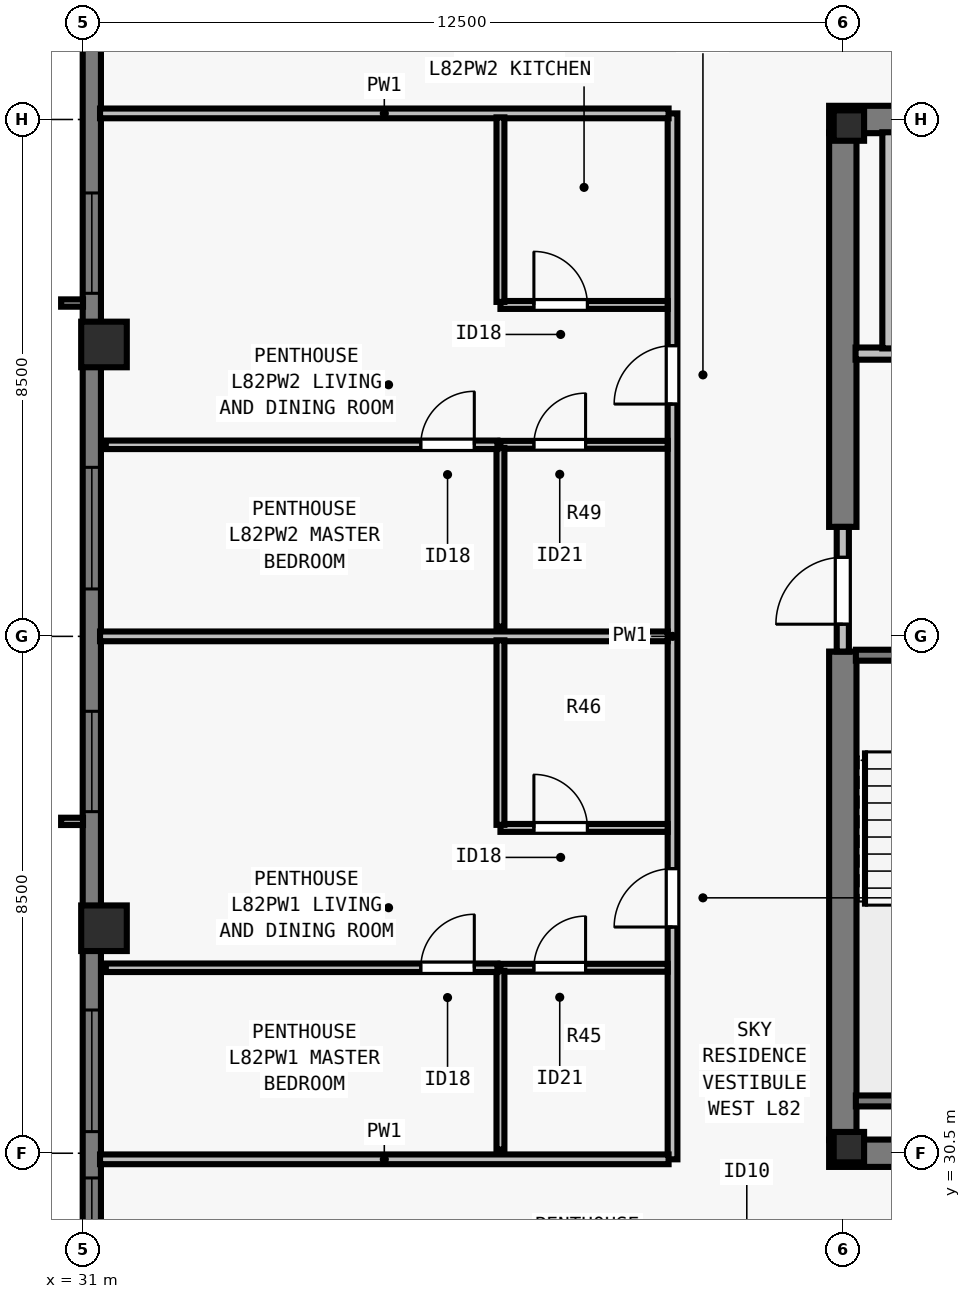
"""IFC4 building model, lengths in metres.
Left out: names, types, materials, properties, quantities, classifications, styles, units other than length and angle.
Written with IfcOpenShell. Run it as: python <this file> out.ifc"""

import sys

from ifc_helpers import new_model, si_unit, direction, frame, frame_2d, origin, origin_2d, place, context, subcontext, project, spatial, rectangle, i_section, extrude, element, fill, save


model = new_model("IFC4")
c1 = context("Model", 3, precision=1e-05, world=origin(), true_north=direction((0.0, 1.0)))
c2 = subcontext(c1, "Body", "Model", "MODEL_VIEW")
j1 = project(units=[si_unit("LENGTHUNIT", "METRE"), si_unit("PLANEANGLEUNIT", "RADIAN")], contexts=[c1])
p1 = place(None, origin())
s1 = spatial("IfcSite", under=j1, at=p1, CompositionType="ELEMENT")
p2 = place(p1, origin())
s2 = spatial("IfcBuilding", under=s1, at=p2, CompositionType="ELEMENT")
p3 = place(p2, frame((0.0, 0.0, 298.0)))
s3 = spatial("IfcBuildingStorey", under=s2, at=p3, CompositionType="ELEMENT", Elevation=298.0)
for number, where, z_axis, x_axis in (
    (1, (43.6, 30.6, 0.0), (0.0, 0.0, 1.0), (1.0, 0.0, 0.0)),
    (2, (43.6, 47.4, 0.0), (0.0, 0.0, 1.0), (1.0, 0.0, 0.0)),
):
    element("IfcColumn", number, at=place(p3, frame(where, z_axis=z_axis, x_axis=x_axis)), inside=s3, PredefinedType="COLUMN", context=c2, shape_type="SweptSolid", body=[
        extrude(i_section(OverallWidth=0.5, OverallDepth=0.5, WebThickness=0.028, FlangeThickness=0.045, at=origin_2d()), origin(), (0.0, 0.0, 1.0), 3.5),
    ])
for number, where, z_axis, x_axis in (
    (3, (31.35, 43.8, 0.0), (0.0, 0.0, 1.0), (0.0, 1.0, 0.0)),
    (4, (31.35, 34.2, 0.0), (0.0, 0.0, 1.0), (0.0, 1.0, 0.0)),
):
    element("IfcColumn", number, at=place(p3, frame(where, z_axis=z_axis, x_axis=x_axis)), inside=s3, PredefinedType="COLUMN", context=c2, shape_type="SweptSolid", body=[
        extrude(rectangle(XDim=0.75, YDim=0.75, at=origin_2d()), origin(), (0.0, 0.0, 1.0), 3.5),
    ])
p4 = place(p3, frame((31.15, 23.5, 0.0), z_axis=(0.0, 0.0, 1.0), x_axis=(0.0, 1.0, 0.0)))
e5 = element("IfcWall", 5, at=p4, inside=s3, PredefinedType="SOLIDWALL", context=c2, shape_type="SweptSolid", body=[
    extrude(rectangle(XDim=30.722, YDim=0.3, at=frame_2d((15.361, 0.0))), origin(), (0.0, 0.0, 1.0), 3.29),
])
p5 = place(p4, frame((4.944, 0.0, 0.8)))
e6 = element("IfcOpeningElement", 6, at=p5, cuts=e5, PredefinedType="OPENING", context=c2, shape_type="SweptSolid", body=[
    extrude(rectangle(XDim=1.65, YDim=1.758, at=frame_2d((0.825, 0.879))), frame((0.0, 0.16, 0.0), z_axis=(0.0, -1.0, 0.0), x_axis=(1.0, 0.0, 0.0)), (0.0, 0.0, 1.0), 0.32),
])
p6 = place(p4, frame((7.355, 0.0, 0.8)))
e7 = element("IfcOpeningElement", 7, at=p6, cuts=e5, PredefinedType="OPENING", context=c2, shape_type="SweptSolid", body=[
    extrude(rectangle(XDim=2.0, YDim=1.758, at=frame_2d((1.0, 0.879))), frame((0.0, 0.16, 0.0), z_axis=(0.0, -1.0, 0.0), x_axis=(1.0, 0.0, 0.0)), (0.0, 0.0, 1.0), 0.32),
])
p7 = place(p4, frame((12.617, 0.0, 0.8)))
e8 = element("IfcOpeningElement", 8, at=p7, cuts=e5, PredefinedType="OPENING", context=c2, shape_type="SweptSolid", body=[
    extrude(rectangle(XDim=1.65, YDim=1.758, at=frame_2d((0.825, 0.879))), frame((0.0, 0.16, 0.0), z_axis=(0.0, -1.0, 0.0), x_axis=(1.0, 0.0, 0.0)), (0.0, 0.0, 1.0), 0.32),
])
p8 = place(p4, frame((16.28, 0.0, 0.8)))
e9 = element("IfcOpeningElement", 9, at=p8, cuts=e5, PredefinedType="OPENING", context=c2, shape_type="SweptSolid", body=[
    extrude(rectangle(XDim=2.0, YDim=1.758, at=frame_2d((1.0, 0.879))), frame((0.0, 0.16, 0.0), z_axis=(0.0, -1.0, 0.0), x_axis=(1.0, 0.0, 0.0)), (0.0, 0.0, 1.0), 0.32),
])
p9 = place(p4, frame((21.142, 0.0, 0.8)))
e10 = element("IfcOpeningElement", 10, at=p9, cuts=e5, PredefinedType="OPENING", context=c2, shape_type="SweptSolid", body=[
    extrude(rectangle(XDim=1.65, YDim=1.758, at=frame_2d((0.825, 0.879))), frame((0.0, 0.16, 0.0), z_axis=(0.0, -1.0, 0.0), x_axis=(1.0, 0.0, 0.0)), (0.0, 0.0, 1.0), 0.32),
])
p10 = place(p4, frame((27.11, 0.0, 0.8)))
e11 = element("IfcOpeningElement", 11, at=p10, cuts=e5, PredefinedType="OPENING", context=c2, shape_type="SweptSolid", body=[
    extrude(rectangle(XDim=0.9, YDim=1.75, at=frame_2d((0.45, 0.875))), frame((0.0, 0.16, 0.0), z_axis=(0.0, -1.0, 0.0), x_axis=(1.0, 0.0, 0.0)), (0.0, 0.0, 1.0), 0.32),
])
for number, where, z_axis, x_axis in (
    (12, (43.275, 30.5, 0.0), (0.0, 0.0, 1.0), (1.0, 0.0, 0.0)),
    (13, (43.275, 47.5, 0.0), (0.0, 0.0, 1.0), (1.0, 0.0, 0.0)),
):
    element("IfcWall", number, at=place(p3, frame(where, z_axis=z_axis, x_axis=x_axis)), inside=s3, PredefinedType="SHEAR", context=c2, shape_type="SweptSolid", body=[
        extrude(rectangle(XDim=17.45, YDim=0.45, at=frame_2d((8.725, 0.0))), origin(), (0.0, 0.0, 1.0), 3.29),
    ])
p11 = place(p3, frame((43.5, 30.715, 0.0), z_axis=(0.0, 0.0, 1.0), x_axis=(0.0, 1.0, 0.0)))
e14 = element("IfcWall", 14, at=p11, inside=s3, PredefinedType="SHEAR", context=c2, shape_type="SweptSolid", body=[
    extrude(rectangle(XDim=8.035, YDim=0.45, at=frame_2d((4.018, 0.0))), origin(), (0.0, 0.0, 1.0), 3.29),
])
p12 = place(p3, frame((43.5, 40.8, 0.0), z_axis=(0.0, 0.0, 1.0), x_axis=(0.0, 1.0, 0.0)))
e15 = element("IfcWall", 15, at=p12, inside=s3, PredefinedType="SHEAR", context=c2, shape_type="SweptSolid", body=[
    extrude(rectangle(XDim=6.485, YDim=0.45, at=frame_2d((3.242, 0.0))), origin(), (0.0, 0.0, 1.0), 3.29),
])
p13 = place(p3, frame((43.5, 38.75, 0.0), z_axis=(0.0, 0.0, 1.0), x_axis=(0.0, 1.0, 0.0)))
e16 = element("IfcWall", 16, at=p13, inside=s3, PredefinedType="SOLIDWALL", context=c2, shape_type="SweptSolid", body=[
    extrude(rectangle(XDim=2.05, YDim=0.2, at=frame_2d((1.025, 0.0))), origin(), (0.0, 0.0, 1.0), 3.29),
])
p14 = place(p13, frame((0.45, 0.0, 0.0)))
e17 = element("IfcOpeningElement", 17, at=p14, cuts=e16, PredefinedType="OPENING", context=c2, shape_type="SweptSolid", body=[
    extrude(rectangle(XDim=1.1, YDim=2.15, at=frame_2d((0.55, 1.075))), frame((0.0, 0.11, 0.0), z_axis=(0.0, -1.0, 0.0), x_axis=(1.0, 0.0, 0.0)), (0.0, 0.0, 1.0), 0.22),
])
p15 = place(p3, frame((43.71, 43.65, 0.0), z_axis=(0.0, 0.0, 1.0), x_axis=(1.0, 0.0, 0.0)))
e18 = element("IfcWall", 18, at=p15, inside=s3, PredefinedType="SOLIDWALL", context=c2, shape_type="SweptSolid", body=[
    extrude(rectangle(XDim=3.555, YDim=0.2, at=frame_2d((1.777, 0.0))), origin(), (0.0, 0.0, 1.0), 3.29),
])
p16 = place(p15, frame((1.16, 0.0, 0.0)))
e19 = element("IfcOpeningElement", 19, at=p16, cuts=e18, PredefinedType="OPENING", context=c2, shape_type="SweptSolid", body=[
    extrude(rectangle(XDim=1.1, YDim=2.2, at=frame_2d((0.55, 1.1))), frame((0.0, 0.11, 0.0), z_axis=(0.0, -1.0, 0.0), x_axis=(1.0, 0.0, 0.0)), (0.0, 0.0, 1.0), 0.22),
])
p17 = place(p3, frame((44.25, 43.735, 0.0), z_axis=(0.0, 0.0, 1.0), x_axis=(0.0, 1.0, 0.0)))
e20 = element("IfcWall", 20, at=p17, inside=s3, PredefinedType="SOLIDWALL", context=c2, shape_type="SweptSolid", body=[
    extrude(rectangle(XDim=3.555, YDim=0.2, at=frame_2d((1.777, 0.0))), origin(), (0.0, 0.0, 1.0), 3.29),
])
p18 = place(p3, frame((40.7, 30.4, 0.0), z_axis=(0.0, 0.0, 1.0), x_axis=(0.0, 1.0, 0.0)))
e21 = element("IfcWall", 21, at=p18, inside=s3, PredefinedType="PARTITIONING", context=c2, shape_type="SweptSolid", body=[
    extrude(rectangle(XDim=17.2, YDim=0.16, at=frame_2d((8.6, 0.0))), origin(), (0.0, 0.0, 1.0), 3.009),
])
p19 = place(p18, frame((3.82, 0.0, 0.0)))
e22 = element("IfcOpeningElement", 22, at=p19, cuts=e21, PredefinedType="OPENING", context=c2, shape_type="SweptSolid", body=[
    extrude(rectangle(XDim=0.96, YDim=2.18, at=frame_2d((0.48, 1.09))), frame((0.0, 0.09, 0.0), z_axis=(0.0, -1.0, 0.0), x_axis=(1.0, 0.0, 0.0)), (0.0, 0.0, 1.0), 0.18),
])
p20 = place(p18, frame((12.42, 0.0, 0.0)))
e23 = element("IfcOpeningElement", 23, at=p20, cuts=e21, PredefinedType="OPENING", context=c2, shape_type="SweptSolid", body=[
    extrude(rectangle(XDim=0.96, YDim=2.18, at=frame_2d((0.48, 1.09))), frame((0.0, 0.09, 0.0), z_axis=(0.0, -1.0, 0.0), x_axis=(1.0, 0.0, 0.0)), (0.0, 0.0, 1.0), 0.18),
])
for number, where, z_axis, x_axis in (
    (24, (31.285, 30.4, 0.0), (0.0, 0.0, 1.0), (1.0, 0.0, 0.0)),
    (25, (31.285, 47.6, 0.0), (0.0, 0.0, 1.0), (1.0, 0.0, 0.0)),
):
    element("IfcWall", number, at=place(p3, frame(where, z_axis=z_axis, x_axis=x_axis)), inside=s3, PredefinedType="PARTITIONING", context=c2, shape_type="SweptSolid", body=[
        extrude(rectangle(XDim=9.35, YDim=0.16, at=frame_2d((4.675, 0.0))), origin(), (0.0, 0.0, 1.0), 3.29),
    ])
p21 = place(p3, frame((31.285, 39.0, 0.0), z_axis=(0.0, 0.0, 1.0), x_axis=(1.0, 0.0, 0.0)))
e26 = element("IfcWall", 26, at=p21, inside=s3, PredefinedType="PARTITIONING", context=c2, shape_type="SweptSolid", body=[
    extrude(rectangle(XDim=9.335, YDim=0.16, at=frame_2d((4.667, 0.0))), origin(), (0.0, 0.0, 1.0), 3.29),
])
p22 = place(p3, frame((37.87, 33.55, 0.0), z_axis=(0.0, 0.0, 1.0), x_axis=(1.0, 0.0, 0.0)))
e27 = element("IfcWall", 27, at=p22, inside=s3, PredefinedType="PLUMBINGWALL", context=c2, shape_type="SweptSolid", body=[
    extrude(rectangle(XDim=2.75, YDim=0.13, at=frame_2d((1.375, 0.0))), origin(), (0.0, 0.0, 1.0), 3.29),
])
p23 = place(p22, frame((0.55, 0.0, 0.0)))
e28 = element("IfcOpeningElement", 28, at=p23, cuts=e27, PredefinedType="OPENING", context=c2, shape_type="SweptSolid", body=[
    extrude(rectangle(XDim=0.85, YDim=2.08, at=frame_2d((0.425, 1.04))), frame((0.0, 0.075, 0.0), z_axis=(0.0, -1.0, 0.0), x_axis=(1.0, 0.0, 0.0)), (0.0, 0.0, 1.0), 0.15),
])
p24 = place(p3, frame((37.87, 30.56, 0.0), z_axis=(0.0, 0.0, 1.0), x_axis=(0.0, 1.0, 0.0)))
e29 = element("IfcWall", 29, at=p24, inside=s3, PredefinedType="PLUMBINGWALL", context=c2, shape_type="SweptSolid", body=[
    extrude(rectangle(XDim=2.94, YDim=0.13, at=frame_2d((1.47, 0.0))), origin(), (0.0, 0.0, 1.0), 3.29),
])
p25 = place(p3, frame((37.87, 35.85, 0.0), z_axis=(0.0, 0.0, 1.0), x_axis=(1.0, 0.0, 0.0)))
e30 = element("IfcWall", 30, at=p25, inside=s3, PredefinedType="PLUMBINGWALL", context=c2, shape_type="SweptSolid", body=[
    extrude(rectangle(XDim=2.75, YDim=0.13, at=frame_2d((1.375, 0.0))), origin(), (0.0, 0.0, 1.0), 3.29),
])
p26 = place(p25, frame((0.55, 0.0, 0.0)))
e31 = element("IfcOpeningElement", 31, at=p26, cuts=e30, PredefinedType="OPENING", context=c2, shape_type="SweptSolid", body=[
    extrude(rectangle(XDim=0.88, YDim=2.1, at=frame_2d((0.44, 1.05))), frame((0.0, 0.075, 0.0), z_axis=(0.0, -1.0, 0.0), x_axis=(1.0, 0.0, 0.0)), (0.0, 0.0, 1.0), 0.15),
])
p27 = place(p3, frame((37.87, 35.9, 0.0), z_axis=(0.0, 0.0, 1.0), x_axis=(0.0, 1.0, 0.0)))
e32 = element("IfcWall", 32, at=p27, inside=s3, PredefinedType="PLUMBINGWALL", context=c2, shape_type="SweptSolid", body=[
    extrude(rectangle(XDim=3.035, YDim=0.13, at=frame_2d((1.518, 0.0))), origin(), (0.0, 0.0, 1.0), 3.29),
])
p28 = place(p3, frame((31.38, 33.55, 0.0), z_axis=(0.0, 0.0, 1.0), x_axis=(1.0, 0.0, 0.0)))
e33 = element("IfcWall", 33, at=p28, inside=s3, PredefinedType="PARTITIONING", context=c2, shape_type="SweptSolid", body=[
    extrude(rectangle(XDim=6.44, YDim=0.14, at=frame_2d((3.22, 0.0))), origin(), (0.0, 0.0, 1.0), 2.653),
])
p29 = place(p28, frame((5.18, 0.0, 0.0)))
e34 = element("IfcOpeningElement", 34, at=p29, cuts=e33, PredefinedType="OPENING", context=c2, shape_type="SweptSolid", body=[
    extrude(rectangle(XDim=0.88, YDim=2.1, at=frame_2d((0.44, 1.05))), frame((0.0, 0.08, 0.0), z_axis=(0.0, -1.0, 0.0), x_axis=(1.0, 0.0, 0.0)), (0.0, 0.0, 1.0), 0.16),
])
p30 = place(p3, frame((37.87, 42.15, 0.0), z_axis=(0.0, 0.0, 1.0), x_axis=(1.0, 0.0, 0.0)))
e35 = element("IfcWall", 35, at=p30, inside=s3, PredefinedType="PLUMBINGWALL", context=c2, shape_type="SweptSolid", body=[
    extrude(rectangle(XDim=2.75, YDim=0.13, at=frame_2d((1.375, 0.0))), origin(), (0.0, 0.0, 1.0), 3.29),
])
p31 = place(p30, frame((0.55, 0.0, 0.0)))
e36 = element("IfcOpeningElement", 36, at=p31, cuts=e35, PredefinedType="OPENING", context=c2, shape_type="SweptSolid", body=[
    extrude(rectangle(XDim=0.85, YDim=2.08, at=frame_2d((0.425, 1.04))), frame((0.0, 0.075, 0.0), z_axis=(0.0, -1.0, 0.0), x_axis=(1.0, 0.0, 0.0)), (0.0, 0.0, 1.0), 0.15),
])
p32 = place(p3, frame((37.87, 39.16, 0.0), z_axis=(0.0, 0.0, 1.0), x_axis=(0.0, 1.0, 0.0)))
e37 = element("IfcWall", 37, at=p32, inside=s3, PredefinedType="PLUMBINGWALL", context=c2, shape_type="SweptSolid", body=[
    extrude(rectangle(XDim=2.94, YDim=0.13, at=frame_2d((1.47, 0.0))), origin(), (0.0, 0.0, 1.0), 3.009),
])
p33 = place(p3, frame((37.87, 44.45, 0.0), z_axis=(0.0, 0.0, 1.0), x_axis=(1.0, 0.0, 0.0)))
e38 = element("IfcWall", 38, at=p33, inside=s3, PredefinedType="PLUMBINGWALL", context=c2, shape_type="SweptSolid", body=[
    extrude(rectangle(XDim=2.75, YDim=0.13, at=frame_2d((1.375, 0.0))), origin(), (0.0, 0.0, 1.0), 3.29),
])
p34 = place(p33, frame((0.55, 0.0, 0.0)))
e39 = element("IfcOpeningElement", 39, at=p34, cuts=e38, PredefinedType="OPENING", context=c2, shape_type="SweptSolid", body=[
    extrude(rectangle(XDim=0.88, YDim=2.1, at=frame_2d((0.44, 1.05))), frame((0.0, 0.075, 0.0), z_axis=(0.0, -1.0, 0.0), x_axis=(1.0, 0.0, 0.0)), (0.0, 0.0, 1.0), 0.15),
])
p35 = place(p3, frame((37.87, 44.5, 0.0), z_axis=(0.0, 0.0, 1.0), x_axis=(0.0, 1.0, 0.0)))
e40 = element("IfcWall", 40, at=p35, inside=s3, PredefinedType="PLUMBINGWALL", context=c2, shape_type="SweptSolid", body=[
    extrude(rectangle(XDim=3.035, YDim=0.13, at=frame_2d((1.518, 0.0))), origin(), (0.0, 0.0, 1.0), 3.29),
])
p36 = place(p3, frame((31.38, 42.15, 0.0), z_axis=(0.0, 0.0, 1.0), x_axis=(1.0, 0.0, 0.0)))
e41 = element("IfcWall", 41, at=p36, inside=s3, PredefinedType="PARTITIONING", context=c2, shape_type="SweptSolid", body=[
    extrude(rectangle(XDim=6.44, YDim=0.14, at=frame_2d((3.22, 0.0))), origin(), (0.0, 0.0, 1.0), 3.29),
])
p37 = place(p36, frame((5.18, 0.0, 0.0)))
e42 = element("IfcOpeningElement", 42, at=p37, cuts=e41, PredefinedType="OPENING", context=c2, shape_type="SweptSolid", body=[
    extrude(rectangle(XDim=0.88, YDim=2.1, at=frame_2d((0.44, 1.05))), frame((0.0, 0.08, 0.0), z_axis=(0.0, -1.0, 0.0), x_axis=(1.0, 0.0, 0.0)), (0.0, 0.0, 1.0), 0.16),
])
p38 = place(p3, frame((43.715, 38.69, 0.0), z_axis=(0.0, 0.0, 1.0), x_axis=(1.0, 0.0, 0.0)))
e43 = element("IfcWall", 43, at=p38, inside=s3, PredefinedType="SOLIDWALL", context=c2, shape_type="SweptSolid", body=[
    extrude(rectangle(XDim=3.28, YDim=0.18, at=frame_2d((1.64, 0.0))), origin(), (0.0, 0.0, 1.0), 3.29),
])
p39 = place(p38, frame((1.165, 0.0, 0.0)))
e44 = element("IfcOpeningElement", 44, at=p39, cuts=e43, PredefinedType="OPENING", context=c2, shape_type="SweptSolid", body=[
    extrude(rectangle(XDim=0.95, YDim=2.15, at=frame_2d((0.475, 1.075))), frame((0.0, 0.1, 0.0), z_axis=(0.0, -1.0, 0.0), x_axis=(1.0, 0.0, 0.0)), (0.0, 0.0, 1.0), 0.2),
])
p40 = place(p3, frame((43.715, 31.36, 0.0), z_axis=(0.0, 0.0, 1.0), x_axis=(1.0, 0.0, 0.0)))
e45 = element("IfcWall", 45, at=p40, inside=s3, PredefinedType="SOLIDWALL", context=c2, shape_type="SweptSolid", body=[
    extrude(rectangle(XDim=3.28, YDim=0.18, at=frame_2d((1.64, 0.0))), origin(), (0.0, 0.0, 1.0), 3.29),
])
p41 = place(p5, origin())
e46 = element("IfcWindow", 46, at=p41, inside=s3, PartitioningType="SINGLE_PANEL", PredefinedType="WINDOW", context=c2, shape_type="SweptSolid", body=[
    extrude(rectangle(XDim=1.65, YDim=1.758, at=frame_2d((0.825, 0.879))), frame((0.0, -0.05, 0.0), z_axis=(0.0, -1.0, 0.0), x_axis=(1.0, 0.0, 0.0)), (0.0, 0.0, 1.0), 0.06),
])
fill(e6, e46)
p42 = place(p6, origin())
e47 = element("IfcWindow", 47, at=p42, inside=s3, PartitioningType="SINGLE_PANEL", PredefinedType="WINDOW", context=c2, shape_type="SweptSolid", body=[
    extrude(rectangle(XDim=2.0, YDim=1.758, at=frame_2d((1.0, 0.879))), frame((0.0, -0.05, 0.0), z_axis=(0.0, -1.0, 0.0), x_axis=(1.0, 0.0, 0.0)), (0.0, 0.0, 1.0), 0.06),
])
fill(e7, e47)
p43 = place(p7, origin())
e48 = element("IfcWindow", 48, at=p43, inside=s3, PartitioningType="SINGLE_PANEL", PredefinedType="WINDOW", context=c2, shape_type="SweptSolid", body=[
    extrude(rectangle(XDim=1.65, YDim=1.758, at=frame_2d((0.825, 0.879))), frame((0.0, -0.05, 0.0), z_axis=(0.0, -1.0, 0.0), x_axis=(1.0, 0.0, 0.0)), (0.0, 0.0, 1.0), 0.06),
])
fill(e8, e48)
p44 = place(p8, origin())
e49 = element("IfcWindow", 49, at=p44, inside=s3, PartitioningType="SINGLE_PANEL", PredefinedType="WINDOW", context=c2, shape_type="SweptSolid", body=[
    extrude(rectangle(XDim=2.0, YDim=1.758, at=frame_2d((1.0, 0.879))), frame((0.0, -0.05, 0.0), z_axis=(0.0, -1.0, 0.0), x_axis=(1.0, 0.0, 0.0)), (0.0, 0.0, 1.0), 0.06),
])
fill(e9, e49)
p45 = place(p9, origin())
e50 = element("IfcWindow", 50, at=p45, inside=s3, PartitioningType="SINGLE_PANEL", PredefinedType="WINDOW", context=c2, shape_type="SweptSolid", body=[
    extrude(rectangle(XDim=1.65, YDim=1.758, at=frame_2d((0.825, 0.879))), frame((0.0, -0.05, 0.0), z_axis=(0.0, -1.0, 0.0), x_axis=(1.0, 0.0, 0.0)), (0.0, 0.0, 1.0), 0.06),
])
fill(e10, e50)
p46 = place(p14, origin())
e51 = element("IfcDoor", 51, at=p46, inside=s3, OperationType="SINGLE_SWING_LEFT", PredefinedType="DOOR", context=c2, shape_type="SweptSolid", body=[
    extrude(rectangle(XDim=1.1, YDim=2.15, at=frame_2d((0.55, 1.075))), frame((0.0, 0.025, 0.0), z_axis=(0.0, -1.0, 0.0), x_axis=(1.0, 0.0, 0.0)), (0.0, 0.0, 1.0), 0.05),
])
fill(e17, e51)
p47 = place(p23, origin())
e52 = element("IfcDoor", 52, at=p47, inside=s3, OperationType="SINGLE_SWING_RIGHT", PredefinedType="DOOR", context=c2, shape_type="SweptSolid", body=[
    extrude(rectangle(XDim=0.85, YDim=2.08, at=frame_2d((0.425, 1.04))), frame((0.0, 0.025, 0.0), z_axis=(0.0, -1.0, 0.0), x_axis=(1.0, 0.0, 0.0)), (0.0, 0.0, 1.0), 0.05),
])
fill(e28, e52)
p48 = place(p26, origin())
e53 = element("IfcDoor", 53, at=p48, inside=s3, OperationType="SINGLE_SWING_LEFT", PredefinedType="DOOR", context=c2, shape_type="SweptSolid", body=[
    extrude(rectangle(XDim=0.88, YDim=2.1, at=frame_2d((0.44, 1.05))), frame((0.0, 0.025, 0.0), z_axis=(0.0, -1.0, 0.0), x_axis=(1.0, 0.0, 0.0)), (0.0, 0.0, 1.0), 0.05),
])
fill(e31, e53)
p49 = place(p29, origin())
e54 = element("IfcDoor", 54, at=p49, inside=s3, OperationType="SINGLE_SWING_RIGHT", PredefinedType="DOOR", context=c2, shape_type="SweptSolid", body=[
    extrude(rectangle(XDim=0.88, YDim=2.1, at=frame_2d((0.44, 1.05))), frame((0.0, 0.025, 0.0), z_axis=(0.0, -1.0, 0.0), x_axis=(1.0, 0.0, 0.0)), (0.0, 0.0, 1.0), 0.05),
])
fill(e34, e54)
p50 = place(p19, origin())
e55 = element("IfcDoor", 55, at=p50, inside=s3, OperationType="SINGLE_SWING_LEFT", PredefinedType="DOOR", context=c2, shape_type="SweptSolid", body=[
    extrude(rectangle(XDim=0.96, YDim=2.18, at=frame_2d((0.48, 1.09))), frame((0.0, 0.025, 0.0), z_axis=(0.0, -1.0, 0.0), x_axis=(1.0, 0.0, 0.0)), (0.0, 0.0, 1.0), 0.05),
])
fill(e22, e55)
p51 = place(p31, origin())
e56 = element("IfcDoor", 56, at=p51, inside=s3, OperationType="SINGLE_SWING_RIGHT", PredefinedType="DOOR", context=c2, shape_type="SweptSolid", body=[
    extrude(rectangle(XDim=0.85, YDim=2.08, at=frame_2d((0.425, 1.04))), frame((0.0, 0.025, 0.0), z_axis=(0.0, -1.0, 0.0), x_axis=(1.0, 0.0, 0.0)), (0.0, 0.0, 1.0), 0.05),
])
fill(e36, e56)
p52 = place(p34, origin())
e57 = element("IfcDoor", 57, at=p52, inside=s3, OperationType="SINGLE_SWING_LEFT", PredefinedType="DOOR", context=c2, shape_type="SweptSolid", body=[
    extrude(rectangle(XDim=0.88, YDim=2.1, at=frame_2d((0.44, 1.05))), frame((0.0, 0.025, 0.0), z_axis=(0.0, -1.0, 0.0), x_axis=(1.0, 0.0, 0.0)), (0.0, 0.0, 1.0), 0.05),
])
fill(e39, e57)
p53 = place(p37, origin())
e58 = element("IfcDoor", 58, at=p53, inside=s3, OperationType="SINGLE_SWING_RIGHT", PredefinedType="DOOR", context=c2, shape_type="SweptSolid", body=[
    extrude(rectangle(XDim=0.88, YDim=2.1, at=frame_2d((0.44, 1.05))), frame((0.0, 0.025, 0.0), z_axis=(0.0, -1.0, 0.0), x_axis=(1.0, 0.0, 0.0)), (0.0, 0.0, 1.0), 0.05),
])
fill(e42, e58)
p54 = place(p20, origin())
e59 = element("IfcDoor", 59, at=p54, inside=s3, OperationType="SINGLE_SWING_LEFT", PredefinedType="DOOR", context=c2, shape_type="SweptSolid", body=[
    extrude(rectangle(XDim=0.96, YDim=2.18, at=frame_2d((0.48, 1.09))), frame((0.0, 0.025, 0.0), z_axis=(0.0, -1.0, 0.0), x_axis=(1.0, 0.0, 0.0)), (0.0, 0.0, 1.0), 0.05),
])
fill(e23, e59)
save(model, sys.argv[1])
